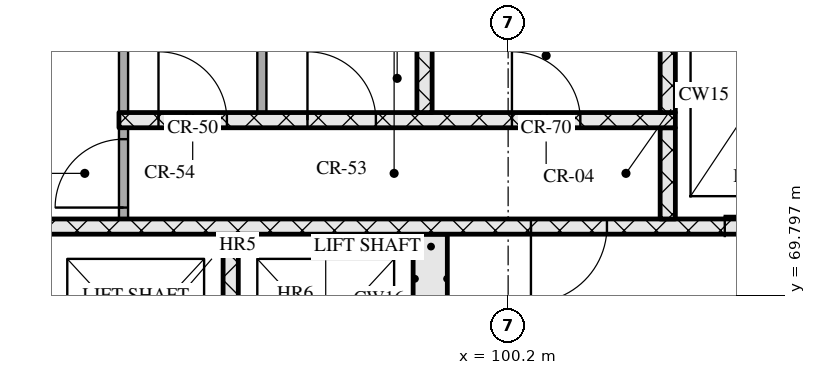
"""IFC4 building model, lengths in metres.
Left out: names, types, materials, properties, quantities, classifications, styles, units other than length and angle.
Written with IfcOpenShell. Run it as: python <this file> out.ifc"""

import sys

from ifc_helpers import new_model, si_unit, direction, frame, frame_2d, origin, place, context, subcontext, project, spatial, rectangle, extrude, element, fill, save


model = new_model("IFC4")
c1 = context("Model", 3, precision=1e-05, world=origin(), true_north=direction((0.0, 1.0)))
c2 = subcontext(c1, "Body", "Model", "MODEL_VIEW")
j1 = project(units=[si_unit("LENGTHUNIT", "METRE"), si_unit("PLANEANGLEUNIT", "RADIAN")], contexts=[c1])
p1 = place(None, origin())
s1 = spatial("IfcSite", under=j1, at=p1, CompositionType="ELEMENT")
p2 = place(p1, origin())
s2 = spatial("IfcBuilding", under=s1, at=p2, CompositionType="ELEMENT")
p3 = place(p2, frame((0.0, 0.0, 176.25)))
s3 = spatial("IfcBuildingStorey", under=s2, at=p3, CompositionType="ELEMENT", Elevation=176.25)
p4 = place(p3, frame((96.55, 68.0, 0.0), z_axis=(0.0, 0.0, 1.0), x_axis=(0.0, 1.0, 0.0)))
e1 = element("IfcWall", 1, at=p4, inside=s3, PredefinedType="SOLIDWALL", context=c2, shape_type="SweptSolid", body=[
    extrude(rectangle(XDim=2.6, YDim=0.2, at=frame_2d((1.3, 0.0))), origin(), (0.0, 0.0, 1.0), 3.32),
])
p5 = place(p3, frame((99.175, 68.3, 0.0), z_axis=(0.0, 0.0, 1.0), x_axis=(0.0, 1.0, 0.0)))
e2 = element("IfcWall", 2, at=p5, inside=s3, PredefinedType="SOLIDWALL", context=c2, shape_type="SweptSolid", body=[
    extrude(rectangle(XDim=2.3, YDim=0.45, at=frame_2d((1.15, 0.0))), origin(), (0.0, 0.0, 1.0), 3.32),
])
p6 = place(p3, frame((67.8, 70.7, 0.0), z_axis=(0.0, 0.0, 1.0), x_axis=(1.0, 0.0, 0.0)))
e3 = element("IfcWall", 3, at=p6, inside=s3, PredefinedType="SOLIDWALL", context=c2, shape_type="SweptSolid", body=[
    extrude(rectangle(XDim=39.6, YDim=0.2, at=frame_2d((19.8, 0.0))), origin(), (0.0, 0.0, 1.0), 3.32),
])
p7 = place(p6, frame((0.65, 0.0, 0.0)))
e4 = element("IfcOpeningElement", 4, at=p7, cuts=e3, PredefinedType="OPENING", context=c2, shape_type="SweptSolid", body=[
    extrude(rectangle(XDim=1.1, YDim=2.1, at=frame_2d((0.55, 1.05))), frame((0.0, 0.11, 0.0), z_axis=(0.0, -1.0, 0.0), x_axis=(1.0, 0.0, 0.0)), (0.0, 0.0, 1.0), 0.22),
])
p8 = place(p6, frame((3.25, 0.0, 0.0)))
e5 = element("IfcOpeningElement", 5, at=p8, cuts=e3, PredefinedType="OPENING", context=c2, shape_type="SweptSolid", body=[
    extrude(rectangle(XDim=1.1, YDim=2.1, at=frame_2d((0.55, 1.05))), frame((0.0, 0.11, 0.0), z_axis=(0.0, -1.0, 0.0), x_axis=(1.0, 0.0, 0.0)), (0.0, 0.0, 1.0), 0.22),
])
p9 = place(p6, frame((5.9, 0.0, 0.0)))
e6 = element("IfcOpeningElement", 6, at=p9, cuts=e3, PredefinedType="OPENING", context=c2, shape_type="SweptSolid", body=[
    extrude(rectangle(XDim=1.0, YDim=2.1, at=frame_2d((0.5, 1.05))), frame((0.0, 0.11, 0.0), z_axis=(0.0, -1.0, 0.0), x_axis=(1.0, 0.0, 0.0)), (0.0, 0.0, 1.0), 0.22),
])
p10 = place(p6, frame((21.7, 0.0, 0.0)))
e7 = element("IfcOpeningElement", 7, at=p10, cuts=e3, PredefinedType="OPENING", context=c2, shape_type="SweptSolid", body=[
    extrude(rectangle(XDim=1.0, YDim=2.1, at=frame_2d((0.5, 1.05))), frame((0.0, 0.11, 0.0), z_axis=(0.0, -1.0, 0.0), x_axis=(1.0, 0.0, 0.0)), (0.0, 0.0, 1.0), 0.22),
])
p11 = place(p6, frame((32.7, 0.0, 0.0)))
e8 = element("IfcOpeningElement", 8, at=p11, cuts=e3, PredefinedType="OPENING", context=c2, shape_type="SweptSolid", body=[
    extrude(rectangle(XDim=1.0, YDim=2.1, at=frame_2d((0.5, 1.05))), frame((0.0, 0.11, 0.0), z_axis=(0.0, -1.0, 0.0), x_axis=(1.0, 0.0, 0.0)), (0.0, 0.0, 1.0), 0.22),
])
p12 = place(p6, frame((35.25, 0.0, 0.0)))
e9 = element("IfcOpeningElement", 9, at=p12, cuts=e3, PredefinedType="OPENING", context=c2, shape_type="SweptSolid", body=[
    extrude(rectangle(XDim=1.1, YDim=2.1, at=frame_2d((0.55, 1.05))), frame((0.0, 0.11, 0.0), z_axis=(0.0, -1.0, 0.0), x_axis=(1.0, 0.0, 0.0)), (0.0, 0.0, 1.0), 0.22),
])
p13 = place(p6, frame((37.85, 0.0, 0.0)))
e10 = element("IfcOpeningElement", 10, at=p13, cuts=e3, PredefinedType="OPENING", context=c2, shape_type="SweptSolid", body=[
    extrude(rectangle(XDim=1.1, YDim=2.1, at=frame_2d((0.55, 1.05))), frame((0.0, 0.11, 0.0), z_axis=(0.0, -1.0, 0.0), x_axis=(1.0, 0.0, 0.0)), (0.0, 0.0, 1.0), 0.22),
])
p14 = place(p3, frame((95.14, 70.8, 0.0), z_axis=(0.0, 0.0, 1.0), x_axis=(0.0, 1.0, 0.0)))
e11 = element("IfcWall", 11, at=p14, inside=s3, PredefinedType="PARTITIONING", context=c2, shape_type="SweptSolid", body=[
    extrude(rectangle(XDim=1.2, YDim=0.12, at=frame_2d((0.6, 0.0))), origin(), (0.0, 0.0, 1.0), 3.32),
])
p15 = place(p14, frame((0.15, 0.0, 0.0)))
e12 = element("IfcOpeningElement", 12, at=p15, cuts=e11, PredefinedType="OPENING", context=c2, shape_type="SweptSolid", body=[
    extrude(rectangle(XDim=0.9, YDim=2.1, at=frame_2d((0.45, 1.05))), frame((0.0, 0.07, 0.0), z_axis=(0.0, -1.0, 0.0), x_axis=(1.0, 0.0, 0.0)), (0.0, 0.0, 1.0), 0.14),
])
p16 = place(p3, frame((102.3, 70.8, 0.0), z_axis=(0.0, 0.0, 1.0), x_axis=(0.0, 1.0, 0.0)))
e13 = element("IfcWall", 13, at=p16, inside=s3, PredefinedType="SOLIDWALL", context=c2, shape_type="SweptSolid", body=[
    extrude(rectangle(XDim=1.2, YDim=0.2, at=frame_2d((0.6, 0.0))), origin(), (0.0, 0.0, 1.0), 3.32),
])
p17 = place(p3, frame((95.08, 72.1, 0.0), z_axis=(0.0, 0.0, 1.0), x_axis=(1.0, 0.0, 0.0)))
e14 = element("IfcWall", 14, at=p17, inside=s3, PredefinedType="SOLIDWALL", context=c2, shape_type="SweptSolid", body=[
    extrude(rectangle(XDim=7.32, YDim=0.2, at=frame_2d((3.66, 0.0))), origin(), (0.0, 0.0, 1.0), 3.32),
])
p18 = place(p17, frame((0.52, 0.0, 0.0)))
e15 = element("IfcOpeningElement", 15, at=p18, cuts=e14, PredefinedType="OPENING", context=c2, shape_type="SweptSolid", body=[
    extrude(rectangle(XDim=0.9, YDim=2.1, at=frame_2d((0.45, 1.05))), frame((0.0, 0.11, 0.0), z_axis=(0.0, -1.0, 0.0), x_axis=(1.0, 0.0, 0.0)), (0.0, 0.0, 1.0), 0.22),
])
p19 = place(p17, frame((2.48, 0.0, 0.0)))
e16 = element("IfcOpeningElement", 16, at=p19, cuts=e14, PredefinedType="OPENING", context=c2, shape_type="SweptSolid", body=[
    extrude(rectangle(XDim=0.9, YDim=2.1, at=frame_2d((0.45, 1.05))), frame((0.0, 0.11, 0.0), z_axis=(0.0, -1.0, 0.0), x_axis=(1.0, 0.0, 0.0)), (0.0, 0.0, 1.0), 0.22),
])
p20 = place(p17, frame((5.17, 0.0, 0.0)))
e17 = element("IfcOpeningElement", 17, at=p20, cuts=e14, PredefinedType="OPENING", context=c2, shape_type="SweptSolid", body=[
    extrude(rectangle(XDim=0.9, YDim=2.1, at=frame_2d((0.45, 1.05))), frame((0.0, 0.11, 0.0), z_axis=(0.0, -1.0, 0.0), x_axis=(1.0, 0.0, 0.0)), (0.0, 0.0, 1.0), 0.22),
])
for number, where, z_axis, x_axis in (
    (18, (95.14, 72.2, 0.0), (0.0, 0.0, 1.0), (0.0, 1.0, 0.0)),
    (19, (96.96, 72.2, 0.0), (0.0, 0.0, 1.0), (0.0, 1.0, 0.0)),
):
    element("IfcWall", number, at=place(p3, frame(where, z_axis=z_axis, x_axis=x_axis)), inside=s3, PredefinedType="PARTITIONING", context=c2, shape_type="SweptSolid", body=[
        extrude(rectangle(XDim=2.2, YDim=0.12, at=frame_2d((1.1, 0.0))), origin(), (0.0, 0.0, 1.0), 3.32),
    ])
for number, where, z_axis, x_axis in (
    (20, (99.1, 72.2, 0.0), (0.0, 0.0, 1.0), (0.0, 1.0, 0.0)),
    (21, (102.3, 72.2, 0.0), (0.0, 0.0, 1.0), (0.0, 1.0, 0.0)),
):
    element("IfcWall", number, at=place(p3, frame(where, z_axis=z_axis, x_axis=x_axis)), inside=s3, PredefinedType="SOLIDWALL", context=c2, shape_type="SweptSolid", body=[
        extrude(rectangle(XDim=2.2, YDim=0.2, at=frame_2d((1.1, 0.0))), origin(), (0.0, 0.0, 1.0), 3.32),
    ])
p21 = place(p11, origin())
e22 = element("IfcDoor", 22, at=p21, inside=s3, OperationType="SINGLE_SWING_RIGHT", PredefinedType="DOOR", context=c2, shape_type="SweptSolid", body=[
    extrude(rectangle(XDim=1.0, YDim=2.1, at=frame_2d((0.5, 1.05))), frame((0.0, 0.025, 0.0), z_axis=(0.0, -1.0, 0.0), x_axis=(1.0, 0.0, 0.0)), (0.0, 0.0, 1.0), 0.05),
])
fill(e8, e22)
p22 = place(p12, origin())
e23 = element("IfcDoor", 23, at=p22, inside=s3, OperationType="SLIDING_TO_RIGHT", PredefinedType="DOOR", context=c2, shape_type="SweptSolid", body=[
    extrude(rectangle(XDim=1.1, YDim=2.1, at=frame_2d((0.55, 1.05))), frame((0.0, 0.025, 0.0), z_axis=(0.0, -1.0, 0.0), x_axis=(1.0, 0.0, 0.0)), (0.0, 0.0, 1.0), 0.05),
])
fill(e9, e23)
p23 = place(p15, origin())
e24 = element("IfcDoor", 24, at=p23, inside=s3, OperationType="SINGLE_SWING_LEFT", PredefinedType="DOOR", context=c2, shape_type="SweptSolid", body=[
    extrude(rectangle(XDim=0.9, YDim=2.1, at=frame_2d((0.45, 1.05))), frame((0.0, 0.025, 0.0), z_axis=(0.0, -1.0, 0.0), x_axis=(1.0, 0.0, 0.0)), (0.0, 0.0, 1.0), 0.05),
])
fill(e12, e24)
p24 = place(p18, origin())
e25 = element("IfcDoor", 25, at=p24, inside=s3, OperationType="SINGLE_SWING_LEFT", PredefinedType="DOOR", context=c2, shape_type="SweptSolid", body=[
    extrude(rectangle(XDim=0.9, YDim=2.1, at=frame_2d((0.45, 1.05))), frame((0.0, 0.025, 0.0), z_axis=(0.0, -1.0, 0.0), x_axis=(1.0, 0.0, 0.0)), (0.0, 0.0, 1.0), 0.05),
])
fill(e15, e25)
p25 = place(p19, origin())
e26 = element("IfcDoor", 26, at=p25, inside=s3, OperationType="SINGLE_SWING_LEFT", PredefinedType="DOOR", context=c2, shape_type="SweptSolid", body=[
    extrude(rectangle(XDim=0.9, YDim=2.1, at=frame_2d((0.45, 1.05))), frame((0.0, 0.025, 0.0), z_axis=(0.0, -1.0, 0.0), x_axis=(1.0, 0.0, 0.0)), (0.0, 0.0, 1.0), 0.05),
])
fill(e16, e26)
p26 = place(p20, origin())
e27 = element("IfcDoor", 27, at=p26, inside=s3, OperationType="SINGLE_SWING_LEFT", PredefinedType="DOOR", context=c2, shape_type="SweptSolid", body=[
    extrude(rectangle(XDim=0.9, YDim=2.1, at=frame_2d((0.45, 1.05))), frame((0.0, 0.025, 0.0), z_axis=(0.0, -1.0, 0.0), x_axis=(1.0, 0.0, 0.0)), (0.0, 0.0, 1.0), 0.05),
])
fill(e17, e27)
save(model, sys.argv[1])
